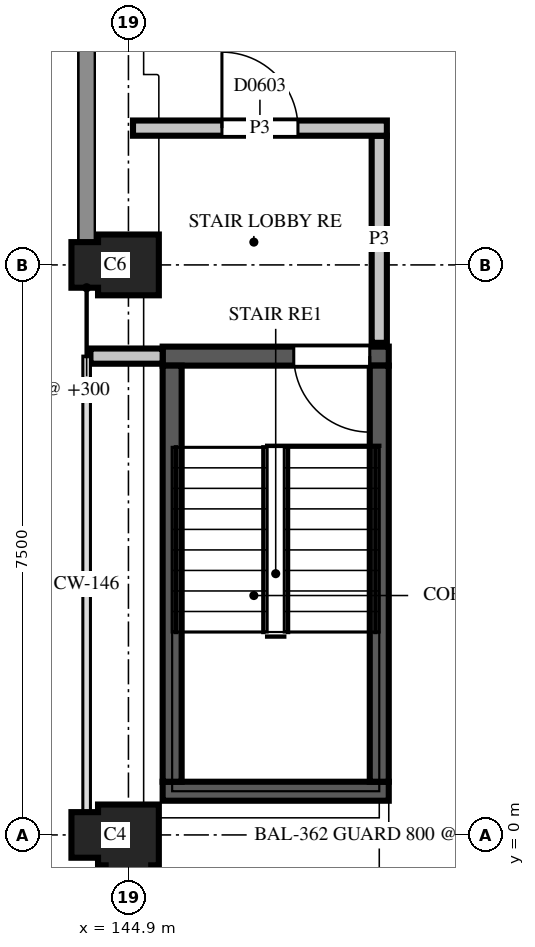
"""IFC4 building model, lengths in metres.
Left out: names, types, materials, properties, quantities, classifications, styles, units other than length and angle.
Written with IfcOpenShell. Run it as: python <this file> out.ifc"""

import sys

from ifc_helpers import new_model, si_unit, direction, frame, frame_2d, origin, place, context, subcontext, project, spatial, polyline, rectangle, outline, extrude, element, fill, save


model = new_model("IFC4")
c1 = context("Model", 3, precision=1e-05, world=origin(), true_north=direction((0.0, 1.0)))
c2 = subcontext(c1, "Body", "Model", "MODEL_VIEW")
j1 = project(units=[si_unit("LENGTHUNIT", "METRE"), si_unit("PLANEANGLEUNIT", "RADIAN")], contexts=[c1])
p1 = place(None, origin())
s1 = spatial("IfcSite", under=j1, at=p1, CompositionType="ELEMENT")
p2 = place(p1, origin())
s2 = spatial("IfcBuilding", under=s1, at=p2, CompositionType="ELEMENT")
p3 = place(p2, frame((0.0, 0.0, 23.0)))
s3 = spatial("IfcBuildingStorey", under=s2, at=p3, CompositionType="ELEMENT", Elevation=23.0)
p4 = place(p3, frame((144.9, 0.0, 0.0), z_axis=(0.0, 0.0, 1.0), x_axis=(-1.0, 0.0, 0.0)))
e1 = element("IfcColumn", 1, at=p4, inside=s3, PredefinedType="COLUMN", context=c2, shape_type="SweptSolid", body=[
    extrude(outline(polyline([(-0.4, -0.4), (0.4, -0.4), (0.4, -0.3), (0.75, -0.3), (0.75, 0.3), (0.4, 0.3), (0.4, 0.4), (0.3, 0.4), (0.3, 0.75), (-0.3, 0.75), (-0.3, 0.4), (-0.4, 0.4), (-0.4, -0.4)])), origin(), (0.0, 0.0, 1.0), 3.7),
])
p5 = place(p3, frame((144.9, 7.5, 0.0), z_axis=(0.0, 0.0, 1.0), x_axis=(-1.0, 0.0, 0.0)))
e2 = element("IfcColumn", 2, at=p5, inside=s3, PredefinedType="COLUMN", context=c2, shape_type="SweptSolid", body=[
    extrude(outline(polyline([(-0.4, -0.4), (0.4, -0.4), (0.4, -0.3), (0.75, -0.3), (0.75, 0.3), (0.4, 0.3), (0.4, 0.4), (-0.4, 0.4), (-0.4, -0.4)])), origin(), (0.0, 0.0, 1.0), 3.7),
])
p6 = place(p3, frame((145.35, 0.575, 0.0), z_axis=(0.0, 0.0, 1.0), x_axis=(1.0, 0.0, 0.0)))
e3 = element("IfcWall", 3, at=p6, inside=s3, PredefinedType="SHEAR", context=c2, shape_type="SweptSolid", body=[
    extrude(rectangle(XDim=2.975, YDim=0.25, at=frame_2d((1.487, 0.0))), origin(), (0.0, 0.0, 1.0), 3.7),
])
p7 = place(p3, frame((145.35, 6.3, 0.0), z_axis=(0.0, 0.0, 1.0), x_axis=(1.0, 0.0, 0.0)))
e4 = element("IfcWall", 4, at=p7, inside=s3, PredefinedType="SHEAR", context=c2, shape_type="SweptSolid", body=[
    extrude(rectangle(XDim=2.975, YDim=0.25, at=frame_2d((1.487, 0.0))), origin(), (0.0, 0.0, 1.0), 3.7),
])
p8 = place(p7, frame((1.725, 0.0, 0.0)))
e5 = element("IfcOpeningElement", 5, at=p8, cuts=e4, PredefinedType="OPENING", context=c2, shape_type="SweptSolid", body=[
    extrude(rectangle(XDim=1.0, YDim=2.1, at=frame_2d((0.5, 1.05))), frame((0.0, 0.135, 0.0), z_axis=(0.0, -1.0, 0.0), x_axis=(1.0, 0.0, 0.0)), (0.0, 0.0, 1.0), 0.27),
])
for number, where, z_axis, x_axis in (
    (6, (145.475, 0.7, 0.0), (0.0, 0.0, 1.0), (0.0, 1.0, 0.0)),
    (7, (148.2, 0.7, 0.0), (0.0, 0.0, 1.0), (0.0, 1.0, 0.0)),
):
    element("IfcWall", number, at=place(p3, frame(where, z_axis=z_axis, x_axis=x_axis)), inside=s3, PredefinedType="SHEAR", context=c2, shape_type="SweptSolid", body=[
        extrude(rectangle(XDim=5.475, YDim=0.25, at=frame_2d((2.738, 0.0))), origin(), (0.0, 0.0, 1.0), 3.7),
    ])
p9 = place(p3, frame((144.4, 6.3, 0.0), z_axis=(0.0, 0.0, 1.0), x_axis=(1.0, 0.0, 0.0)))
e8 = element("IfcWall", 8, at=p9, inside=s3, PredefinedType="PARTITIONING", context=c2, shape_type="SweptSolid", body=[
    extrude(rectangle(XDim=0.95, YDim=0.2, at=frame_2d((0.475, 0.0))), origin(), (0.0, 0.0, 1.0), 2.88),
])
p10 = place(p3, frame((148.2, 6.475, 0.0), z_axis=(0.0, 0.0, 1.0), x_axis=(0.0, 1.0, 0.0)))
e9 = element("IfcWall", 9, at=p10, inside=s3, PredefinedType="PARTITIONING", context=c2, shape_type="SweptSolid", body=[
    extrude(rectangle(XDim=2.725, YDim=0.2, at=frame_2d((1.362, 0.0))), origin(), (0.0, 0.0, 1.0), 2.88),
])
p11 = place(p3, frame((148.3, 9.3, 0.0), z_axis=(0.0, 0.0, 1.0), x_axis=(-1.0, 0.0, 0.0)))
e10 = element("IfcWall", 10, at=p11, inside=s3, PredefinedType="PARTITIONING", context=c2, shape_type="SweptSolid", body=[
    extrude(rectangle(XDim=3.34, YDim=0.2, at=frame_2d((1.67, 0.0))), origin(), (0.0, 0.0, 1.0), 2.88),
])
p12 = place(p11, frame((1.17, 0.0, 0.0)))
e11 = element("IfcOpeningElement", 11, at=p12, cuts=e10, PredefinedType="OPENING", context=c2, shape_type="SweptSolid", body=[
    extrude(rectangle(XDim=1.0, YDim=2.1, at=frame_2d((0.5, 1.05))), frame((0.0, 0.11, 0.0), z_axis=(0.0, -1.0, 0.0), x_axis=(1.0, 0.0, 0.0)), (0.0, 0.0, 1.0), 0.22),
])
p13 = place(p12, origin())
e12 = element("IfcDoor", 12, at=p13, inside=s3, OperationType="SINGLE_SWING_RIGHT", PredefinedType="DOOR", context=c2, shape_type="SweptSolid", body=[
    extrude(rectangle(XDim=1.0, YDim=2.1, at=frame_2d((0.5, 1.05))), frame((0.0, 0.025, 0.0), z_axis=(0.0, -1.0, 0.0), x_axis=(1.0, 0.0, 0.0)), (0.0, 0.0, 1.0), 0.05),
])
fill(e11, e12)
p14 = place(p8, origin())
e13 = element("IfcDoor", 13, at=p14, inside=s3, OperationType="SINGLE_SWING_RIGHT", PredefinedType="DOOR", context=c2, shape_type="SweptSolid", body=[
    extrude(rectangle(XDim=1.0, YDim=2.1, at=frame_2d((0.5, 1.05))), frame((0.0, 0.025, 0.0), z_axis=(0.0, -1.0, 0.0), x_axis=(1.0, 0.0, 0.0)), (0.0, 0.0, 1.0), 0.05),
])
fill(e5, e13)
save(model, sys.argv[1])
